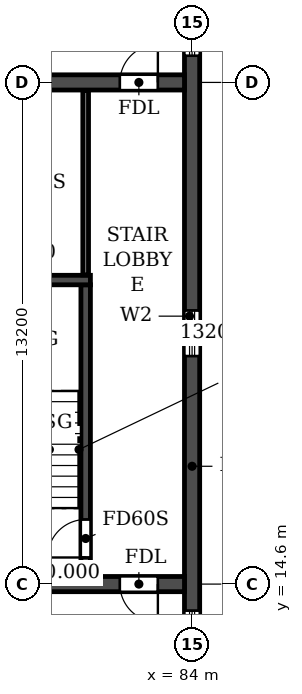
"""IFC4 building model, lengths in metres.
Left out: names, types, materials, properties, quantities, classifications, styles, units other than length and angle.
Written with IfcOpenShell. Run it as: python <this file> out.ifc"""

import sys

from ifc_helpers import new_model, si_unit, direction, frame, frame_2d, origin, place, context, subcontext, project, spatial, rectangle, extrude, element, fill, save


model = new_model("IFC4")
c1 = context("Model", 3, precision=1e-05, world=origin(), true_north=direction((0.0, 1.0)))
c2 = subcontext(c1, "Body", "Model", "MODEL_VIEW")
j1 = project(units=[si_unit("LENGTHUNIT", "METRE"), si_unit("PLANEANGLEUNIT", "RADIAN")], contexts=[c1])
p1 = place(None, origin())
s1 = spatial("IfcSite", under=j1, at=p1, CompositionType="ELEMENT")
p2 = place(p1, origin())
s2 = spatial("IfcBuilding", under=s1, at=p2, CompositionType="ELEMENT")
p3 = place(p2, frame((0.0, 0.0, 191.7)))
s3 = spatial("IfcBuildingStorey", under=s2, at=p3, CompositionType="ELEMENT", Elevation=191.7)
p4 = place(p3, frame((84.0, 4.683, 0.0), z_axis=(0.0, 0.0, 1.0), x_axis=(0.0, 1.0, 0.0)))
e1 = element("IfcWall", 1, at=p4, inside=s3, PredefinedType="SHEAR", context=c2, shape_type="SweptSolid", body=[
    extrude(rectangle(XDim=31.834, YDim=0.4, at=frame_2d((15.917, 0.0))), origin(), (0.0, 0.0, 1.0), 3.08),
])
p5 = place(p4, frame((23.817, 0.0, 0.9)))
e2 = element("IfcOpeningElement", 2, at=p5, cuts=e1, PredefinedType="OPENING", context=c2, shape_type="SweptSolid", body=[
    extrude(rectangle(XDim=1.2, YDim=1.5, at=frame_2d((0.6, 0.75))), frame((0.0, 0.21, 0.0), z_axis=(0.0, -1.0, 0.0), x_axis=(1.0, 0.0, 0.0)), (0.0, 0.0, 1.0), 0.42),
])
p6 = place(p4, frame((8.017, 0.0, 0.9)))
e3 = element("IfcOpeningElement", 3, at=p6, cuts=e1, PredefinedType="OPENING", context=c2, shape_type="SweptSolid", body=[
    extrude(rectangle(XDim=1.2, YDim=1.5, at=frame_2d((0.6, 0.75))), frame((0.0, 0.21, 0.0), z_axis=(0.0, -1.0, 0.0), x_axis=(1.0, 0.0, 0.0)), (0.0, 0.0, 1.0), 0.42),
])
p7 = place(p4, frame((27.694, 0.0, 0.6)))
e4 = element("IfcOpeningElement", 4, at=p7, cuts=e1, PredefinedType="OPENING", context=c2, shape_type="SweptSolid", body=[
    extrude(rectangle(XDim=2.2, YDim=1.8, at=frame_2d((1.1, 0.9))), frame((0.0, 0.21, 0.0), z_axis=(0.0, -1.0, 0.0), x_axis=(1.0, 0.0, 0.0)), (0.0, 0.0, 1.0), 0.42),
])
p8 = place(p4, frame((2.541, 0.0, 0.6)))
e5 = element("IfcOpeningElement", 5, at=p8, cuts=e1, PredefinedType="OPENING", context=c2, shape_type="SweptSolid", body=[
    extrude(rectangle(XDim=2.2, YDim=1.8, at=frame_2d((1.1, 0.9))), frame((0.0, 0.21, 0.0), z_axis=(0.0, -1.0, 0.0), x_axis=(1.0, 0.0, 0.0)), (0.0, 0.0, 1.0), 0.42),
])
p9 = place(p4, frame((15.917, 0.0, 0.9)))
e6 = element("IfcOpeningElement", 6, at=p9, cuts=e1, PredefinedType="OPENING", context=c2, shape_type="SweptSolid", body=[
    extrude(rectangle(XDim=1.2, YDim=1.5, at=frame_2d((0.6, 0.75))), frame((0.0, 0.21, 0.0), z_axis=(0.0, -1.0, 0.0), x_axis=(1.0, 0.0, 0.0)), (0.0, 0.0, 1.0), 0.42),
])
p10 = place(p3, frame((18.2, 14.6, 0.0), z_axis=(0.0, 0.0, 1.0), x_axis=(1.0, 0.0, 0.0)))
e7 = element("IfcWall", 7, at=p10, inside=s3, PredefinedType="SOLIDWALL", context=c2, shape_type="SweptSolid", body=[
    extrude(rectangle(XDim=65.6, YDim=0.4, at=frame_2d((32.8, 0.0))), origin(), (0.0, 0.0, 1.0), 3.08),
])
p11 = place(p10, frame((0.7, 0.0, 0.0)))
e8 = element("IfcOpeningElement", 8, at=p11, cuts=e7, PredefinedType="OPENING", context=c2, shape_type="SweptSolid", body=[
    extrude(rectangle(XDim=1.0, YDim=2.1, at=frame_2d((0.5, 1.05))), frame((0.0, 0.21, 0.0), z_axis=(0.0, -1.0, 0.0), x_axis=(1.0, 0.0, 0.0)), (0.0, 0.0, 1.0), 0.42),
])
p12 = place(p10, frame((8.6, 0.0, 0.0)))
e9 = element("IfcOpeningElement", 9, at=p12, cuts=e7, PredefinedType="OPENING", context=c2, shape_type="SweptSolid", body=[
    extrude(rectangle(XDim=1.0, YDim=2.1, at=frame_2d((0.5, 1.05))), frame((0.0, 0.21, 0.0), z_axis=(0.0, -1.0, 0.0), x_axis=(1.0, 0.0, 0.0)), (0.0, 0.0, 1.0), 0.42),
])
p13 = place(p10, frame((13.2, 0.0, 0.0)))
e10 = element("IfcOpeningElement", 10, at=p13, cuts=e7, PredefinedType="OPENING", context=c2, shape_type="SweptSolid", body=[
    extrude(rectangle(XDim=1.0, YDim=2.1, at=frame_2d((0.5, 1.05))), frame((0.0, 0.21, 0.0), z_axis=(0.0, -1.0, 0.0), x_axis=(1.0, 0.0, 0.0)), (0.0, 0.0, 1.0), 0.42),
])
p14 = place(p10, frame((25.55, 0.0, 0.0)))
e11 = element("IfcOpeningElement", 11, at=p14, cuts=e7, PredefinedType="OPENING", context=c2, shape_type="SweptSolid", body=[
    extrude(rectangle(XDim=1.5, YDim=2.1, at=frame_2d((0.75, 1.05))), frame((0.0, 0.21, 0.0), z_axis=(0.0, -1.0, 0.0), x_axis=(1.0, 0.0, 0.0)), (0.0, 0.0, 1.0), 0.42),
])
p15 = place(p10, frame((29.7, 0.0, 0.0)))
e12 = element("IfcOpeningElement", 12, at=p15, cuts=e7, PredefinedType="OPENING", context=c2, shape_type="SweptSolid", body=[
    extrude(rectangle(XDim=1.0, YDim=2.1, at=frame_2d((0.5, 1.05))), frame((0.0, 0.21, 0.0), z_axis=(0.0, -1.0, 0.0), x_axis=(1.0, 0.0, 0.0)), (0.0, 0.0, 1.0), 0.42),
])
p16 = place(p10, frame((32.3, 0.0, 0.0)))
e13 = element("IfcOpeningElement", 13, at=p16, cuts=e7, PredefinedType="OPENING", context=c2, shape_type="SweptSolid", body=[
    extrude(rectangle(XDim=1.0, YDim=2.1, at=frame_2d((0.5, 1.05))), frame((0.0, 0.21, 0.0), z_axis=(0.0, -1.0, 0.0), x_axis=(1.0, 0.0, 0.0)), (0.0, 0.0, 1.0), 0.42),
])
p17 = place(p10, frame((34.9, 0.0, 0.0)))
e14 = element("IfcOpeningElement", 14, at=p17, cuts=e7, PredefinedType="OPENING", context=c2, shape_type="SweptSolid", body=[
    extrude(rectangle(XDim=1.0, YDim=2.1, at=frame_2d((0.5, 1.05))), frame((0.0, 0.21, 0.0), z_axis=(0.0, -1.0, 0.0), x_axis=(1.0, 0.0, 0.0)), (0.0, 0.0, 1.0), 0.42),
])
p18 = place(p10, frame((38.55, 0.0, 0.0)))
e15 = element("IfcOpeningElement", 15, at=p18, cuts=e7, PredefinedType="OPENING", context=c2, shape_type="SweptSolid", body=[
    extrude(rectangle(XDim=1.5, YDim=2.1, at=frame_2d((0.75, 1.05))), frame((0.0, 0.21, 0.0), z_axis=(0.0, -1.0, 0.0), x_axis=(1.0, 0.0, 0.0)), (0.0, 0.0, 1.0), 0.42),
])
p19 = place(p10, frame((51.4, 0.0, 0.0)))
e16 = element("IfcOpeningElement", 16, at=p19, cuts=e7, PredefinedType="OPENING", context=c2, shape_type="SweptSolid", body=[
    extrude(rectangle(XDim=1.0, YDim=2.1, at=frame_2d((0.5, 1.05))), frame((0.0, 0.21, 0.0), z_axis=(0.0, -1.0, 0.0), x_axis=(1.0, 0.0, 0.0)), (0.0, 0.0, 1.0), 0.42),
])
p20 = place(p10, frame((56.0, 0.0, 0.0)))
e17 = element("IfcOpeningElement", 17, at=p20, cuts=e7, PredefinedType="OPENING", context=c2, shape_type="SweptSolid", body=[
    extrude(rectangle(XDim=1.0, YDim=2.1, at=frame_2d((0.5, 1.05))), frame((0.0, 0.21, 0.0), z_axis=(0.0, -1.0, 0.0), x_axis=(1.0, 0.0, 0.0)), (0.0, 0.0, 1.0), 0.42),
])
p21 = place(p10, frame((63.9, 0.0, 0.0)))
e18 = element("IfcOpeningElement", 18, at=p21, cuts=e7, PredefinedType="OPENING", context=c2, shape_type="SweptSolid", body=[
    extrude(rectangle(XDim=1.0, YDim=2.1, at=frame_2d((0.5, 1.05))), frame((0.0, 0.21, 0.0), z_axis=(0.0, -1.0, 0.0), x_axis=(1.0, 0.0, 0.0)), (0.0, 0.0, 1.0), 0.42),
])
p22 = place(p3, frame((18.2, 27.8, 0.0), z_axis=(0.0, 0.0, 1.0), x_axis=(1.0, 0.0, 0.0)))
e19 = element("IfcWall", 19, at=p22, inside=s3, PredefinedType="SOLIDWALL", context=c2, shape_type="SweptSolid", body=[
    extrude(rectangle(XDim=65.6, YDim=0.4, at=frame_2d((32.8, 0.0))), origin(), (0.0, 0.0, 1.0), 3.08),
])
p23 = place(p22, frame((0.7, 0.0, 0.0)))
e20 = element("IfcOpeningElement", 20, at=p23, cuts=e19, PredefinedType="OPENING", context=c2, shape_type="SweptSolid", body=[
    extrude(rectangle(XDim=1.0, YDim=2.1, at=frame_2d((0.5, 1.05))), frame((0.0, 0.21, 0.0), z_axis=(0.0, -1.0, 0.0), x_axis=(1.0, 0.0, 0.0)), (0.0, 0.0, 1.0), 0.42),
])
p24 = place(p22, frame((4.05, 0.0, 0.0)))
e21 = element("IfcOpeningElement", 21, at=p24, cuts=e19, PredefinedType="OPENING", context=c2, shape_type="SweptSolid", body=[
    extrude(rectangle(XDim=0.9, YDim=2.1, at=frame_2d((0.45, 1.05))), frame((0.0, 0.21, 0.0), z_axis=(0.0, -1.0, 0.0), x_axis=(1.0, 0.0, 0.0)), (0.0, 0.0, 1.0), 0.42),
])
p25 = place(p22, frame((13.25, 0.0, 0.0)))
e22 = element("IfcOpeningElement", 22, at=p25, cuts=e19, PredefinedType="OPENING", context=c2, shape_type="SweptSolid", body=[
    extrude(rectangle(XDim=0.9, YDim=2.1, at=frame_2d((0.45, 1.05))), frame((0.0, 0.21, 0.0), z_axis=(0.0, -1.0, 0.0), x_axis=(1.0, 0.0, 0.0)), (0.0, 0.0, 1.0), 0.42),
])
p26 = place(p22, frame((16.4, 0.0, 0.0)))
e23 = element("IfcOpeningElement", 23, at=p26, cuts=e19, PredefinedType="OPENING", context=c2, shape_type="SweptSolid", body=[
    extrude(rectangle(XDim=1.0, YDim=2.1, at=frame_2d((0.5, 1.05))), frame((0.0, 0.21, 0.0), z_axis=(0.0, -1.0, 0.0), x_axis=(1.0, 0.0, 0.0)), (0.0, 0.0, 1.0), 0.42),
])
p27 = place(p22, frame((21.6, 0.0, 0.0)))
e24 = element("IfcOpeningElement", 24, at=p27, cuts=e19, PredefinedType="OPENING", context=c2, shape_type="SweptSolid", body=[
    extrude(rectangle(XDim=1.0, YDim=2.1, at=frame_2d((0.5, 1.05))), frame((0.0, 0.21, 0.0), z_axis=(0.0, -1.0, 0.0), x_axis=(1.0, 0.0, 0.0)), (0.0, 0.0, 1.0), 0.42),
])
p28 = place(p22, frame((29.4, 0.0, 0.0)))
e25 = element("IfcOpeningElement", 25, at=p28, cuts=e19, PredefinedType="OPENING", context=c2, shape_type="SweptSolid", body=[
    extrude(rectangle(XDim=1.0, YDim=2.1, at=frame_2d((0.5, 1.05))), frame((0.0, 0.21, 0.0), z_axis=(0.0, -1.0, 0.0), x_axis=(1.0, 0.0, 0.0)), (0.0, 0.0, 1.0), 0.42),
])
p29 = place(p22, frame((32.3, 0.0, 0.0)))
e26 = element("IfcOpeningElement", 26, at=p29, cuts=e19, PredefinedType="OPENING", context=c2, shape_type="SweptSolid", body=[
    extrude(rectangle(XDim=1.0, YDim=2.1, at=frame_2d((0.5, 1.05))), frame((0.0, 0.21, 0.0), z_axis=(0.0, -1.0, 0.0), x_axis=(1.0, 0.0, 0.0)), (0.0, 0.0, 1.0), 0.42),
])
p30 = place(p22, frame((35.2, 0.0, 0.0)))
e27 = element("IfcOpeningElement", 27, at=p30, cuts=e19, PredefinedType="OPENING", context=c2, shape_type="SweptSolid", body=[
    extrude(rectangle(XDim=1.0, YDim=2.1, at=frame_2d((0.5, 1.05))), frame((0.0, 0.21, 0.0), z_axis=(0.0, -1.0, 0.0), x_axis=(1.0, 0.0, 0.0)), (0.0, 0.0, 1.0), 0.42),
])
p31 = place(p22, frame((37.8, 0.0, 0.0)))
e28 = element("IfcOpeningElement", 28, at=p31, cuts=e19, PredefinedType="OPENING", context=c2, shape_type="SweptSolid", body=[
    extrude(rectangle(XDim=1.0, YDim=2.1, at=frame_2d((0.5, 1.05))), frame((0.0, 0.21, 0.0), z_axis=(0.0, -1.0, 0.0), x_axis=(1.0, 0.0, 0.0)), (0.0, 0.0, 1.0), 0.42),
])
p32 = place(p22, frame((41.7, 0.0, 0.0)))
e29 = element("IfcOpeningElement", 29, at=p32, cuts=e19, PredefinedType="OPENING", context=c2, shape_type="SweptSolid", body=[
    extrude(rectangle(XDim=1.0, YDim=2.1, at=frame_2d((0.5, 1.05))), frame((0.0, 0.21, 0.0), z_axis=(0.0, -1.0, 0.0), x_axis=(1.0, 0.0, 0.0)), (0.0, 0.0, 1.0), 0.42),
])
p33 = place(p22, frame((45.6, 0.0, 0.0)))
e30 = element("IfcOpeningElement", 30, at=p33, cuts=e19, PredefinedType="OPENING", context=c2, shape_type="SweptSolid", body=[
    extrude(rectangle(XDim=1.0, YDim=2.1, at=frame_2d((0.5, 1.05))), frame((0.0, 0.21, 0.0), z_axis=(0.0, -1.0, 0.0), x_axis=(1.0, 0.0, 0.0)), (0.0, 0.0, 1.0), 0.42),
])
p34 = place(p22, frame((48.2, 0.0, 0.0)))
e31 = element("IfcOpeningElement", 31, at=p34, cuts=e19, PredefinedType="OPENING", context=c2, shape_type="SweptSolid", body=[
    extrude(rectangle(XDim=1.0, YDim=2.1, at=frame_2d((0.5, 1.05))), frame((0.0, 0.21, 0.0), z_axis=(0.0, -1.0, 0.0), x_axis=(1.0, 0.0, 0.0)), (0.0, 0.0, 1.0), 0.42),
])
p35 = place(p22, frame((51.45, 0.0, 0.0)))
e32 = element("IfcOpeningElement", 32, at=p35, cuts=e19, PredefinedType="OPENING", context=c2, shape_type="SweptSolid", body=[
    extrude(rectangle(XDim=0.9, YDim=2.1, at=frame_2d((0.45, 1.05))), frame((0.0, 0.21, 0.0), z_axis=(0.0, -1.0, 0.0), x_axis=(1.0, 0.0, 0.0)), (0.0, 0.0, 1.0), 0.42),
])
p36 = place(p22, frame((60.65, 0.0, 0.0)))
e33 = element("IfcOpeningElement", 33, at=p36, cuts=e19, PredefinedType="OPENING", context=c2, shape_type="SweptSolid", body=[
    extrude(rectangle(XDim=0.9, YDim=2.1, at=frame_2d((0.45, 1.05))), frame((0.0, 0.21, 0.0), z_axis=(0.0, -1.0, 0.0), x_axis=(1.0, 0.0, 0.0)), (0.0, 0.0, 1.0), 0.42),
])
p37 = place(p22, frame((63.9, 0.0, 0.0)))
e34 = element("IfcOpeningElement", 34, at=p37, cuts=e19, PredefinedType="OPENING", context=c2, shape_type="SweptSolid", body=[
    extrude(rectangle(XDim=1.0, YDim=2.1, at=frame_2d((0.5, 1.05))), frame((0.0, 0.21, 0.0), z_axis=(0.0, -1.0, 0.0), x_axis=(1.0, 0.0, 0.0)), (0.0, 0.0, 1.0), 0.42),
])
p38 = place(p3, frame((81.2, 14.8, 0.0), z_axis=(0.0, 0.0, 1.0), x_axis=(0.0, 1.0, 0.0)))
e35 = element("IfcWall", 35, at=p38, inside=s3, PredefinedType="SOLIDWALL", context=c2, shape_type="SweptSolid", body=[
    extrude(rectangle(XDim=7.675, YDim=0.25, at=frame_2d((3.837, 0.0))), origin(), (0.0, 0.0, 1.0), 3.08),
])
p39 = place(p38, frame((0.5, 0.0, 0.0)))
e36 = element("IfcOpeningElement", 36, at=p39, cuts=e35, PredefinedType="OPENING", context=c2, shape_type="SweptSolid", body=[
    extrude(rectangle(XDim=1.0, YDim=2.1, at=frame_2d((0.5, 1.05))), frame((0.0, 0.135, 0.0), z_axis=(0.0, -1.0, 0.0), x_axis=(1.0, 0.0, 0.0)), (0.0, 0.0, 1.0), 0.27),
])
p40 = place(p3, frame((77.275, 22.6, 0.0), z_axis=(0.0, 0.0, 1.0), x_axis=(1.0, 0.0, 0.0)))
e37 = element("IfcWall", 37, at=p40, inside=s3, PredefinedType="SOLIDWALL", context=c2, shape_type="SweptSolid", body=[
    extrude(rectangle(XDim=4.05, YDim=0.25, at=frame_2d((2.025, 0.0))), origin(), (0.0, 0.0, 1.0), 3.08),
])
p41 = place(p3, frame((81.2, 22.735, 0.0), z_axis=(0.0, 0.0, 1.0), x_axis=(0.0, 1.0, 0.0)))
e38 = element("IfcWall", 38, at=p41, inside=s3, PredefinedType="PARTITIONING", context=c2, shape_type="SweptSolid", body=[
    extrude(rectangle(XDim=4.855, YDim=0.15, at=frame_2d((2.427, 0.0))), origin(), (0.0, 0.0, 1.0), 3.08),
])
p42 = place(p5, origin())
e39 = element("IfcWindow", 39, at=p42, inside=s3, PartitioningType="SINGLE_PANEL", PredefinedType="WINDOW", context=c2, shape_type="SweptSolid", body=[
    extrude(rectangle(XDim=1.2, YDim=1.5, at=frame_2d((0.6, 0.75))), frame((0.0, 0.03, 0.0), z_axis=(0.0, -1.0, 0.0), x_axis=(1.0, 0.0, 0.0)), (0.0, 0.0, 1.0), 0.06),
])
fill(e2, e39)
p43 = place(p6, origin())
e40 = element("IfcWindow", 40, at=p43, inside=s3, PartitioningType="SINGLE_PANEL", PredefinedType="WINDOW", context=c2, shape_type="SweptSolid", body=[
    extrude(rectangle(XDim=1.2, YDim=1.5, at=frame_2d((0.6, 0.75))), frame((0.0, 0.03, 0.0), z_axis=(0.0, -1.0, 0.0), x_axis=(1.0, 0.0, 0.0)), (0.0, 0.0, 1.0), 0.06),
])
fill(e3, e40)
p44 = place(p9, origin())
e41 = element("IfcWindow", 41, at=p44, inside=s3, PartitioningType="SINGLE_PANEL", PredefinedType="WINDOW", context=c2, shape_type="SweptSolid", body=[
    extrude(rectangle(XDim=1.2, YDim=1.5, at=frame_2d((0.6, 0.75))), frame((0.0, 0.03, 0.0), z_axis=(0.0, -1.0, 0.0), x_axis=(1.0, 0.0, 0.0)), (0.0, 0.0, 1.0), 0.06),
])
fill(e6, e41)
p45 = place(p37, origin())
e42 = element("IfcDoor", 42, at=p45, inside=s3, OperationType="SINGLE_SWING_RIGHT", PredefinedType="DOOR", context=c2, shape_type="SweptSolid", body=[
    extrude(rectangle(XDim=1.0, YDim=2.1, at=frame_2d((0.5, 1.05))), frame((0.0, 0.025, 0.0), z_axis=(0.0, -1.0, 0.0), x_axis=(1.0, 0.0, 0.0)), (0.0, 0.0, 1.0), 0.05),
])
fill(e34, e42)
p46 = place(p21, frame((1.0, 0.0, 0.0), z_axis=(0.0, 0.0, 1.0), x_axis=(-1.0, 0.0, 0.0)))
e43 = element("IfcDoor", 43, at=p46, inside=s3, OperationType="SINGLE_SWING_LEFT", PredefinedType="DOOR", context=c2, shape_type="SweptSolid", body=[
    extrude(rectangle(XDim=1.0, YDim=2.1, at=frame_2d((0.5, 1.05))), frame((0.0, 0.025, 0.0), z_axis=(0.0, -1.0, 0.0), x_axis=(1.0, 0.0, 0.0)), (0.0, 0.0, 1.0), 0.05),
])
fill(e18, e43)
p47 = place(p39, origin())
e44 = element("IfcDoor", 44, at=p47, inside=s3, OperationType="SINGLE_SWING_LEFT", PredefinedType="DOOR", context=c2, shape_type="SweptSolid", body=[
    extrude(rectangle(XDim=1.0, YDim=2.1, at=frame_2d((0.5, 1.05))), frame((0.0, 0.025, 0.0), z_axis=(0.0, -1.0, 0.0), x_axis=(1.0, 0.0, 0.0)), (0.0, 0.0, 1.0), 0.05),
])
fill(e36, e44)
save(model, sys.argv[1])
